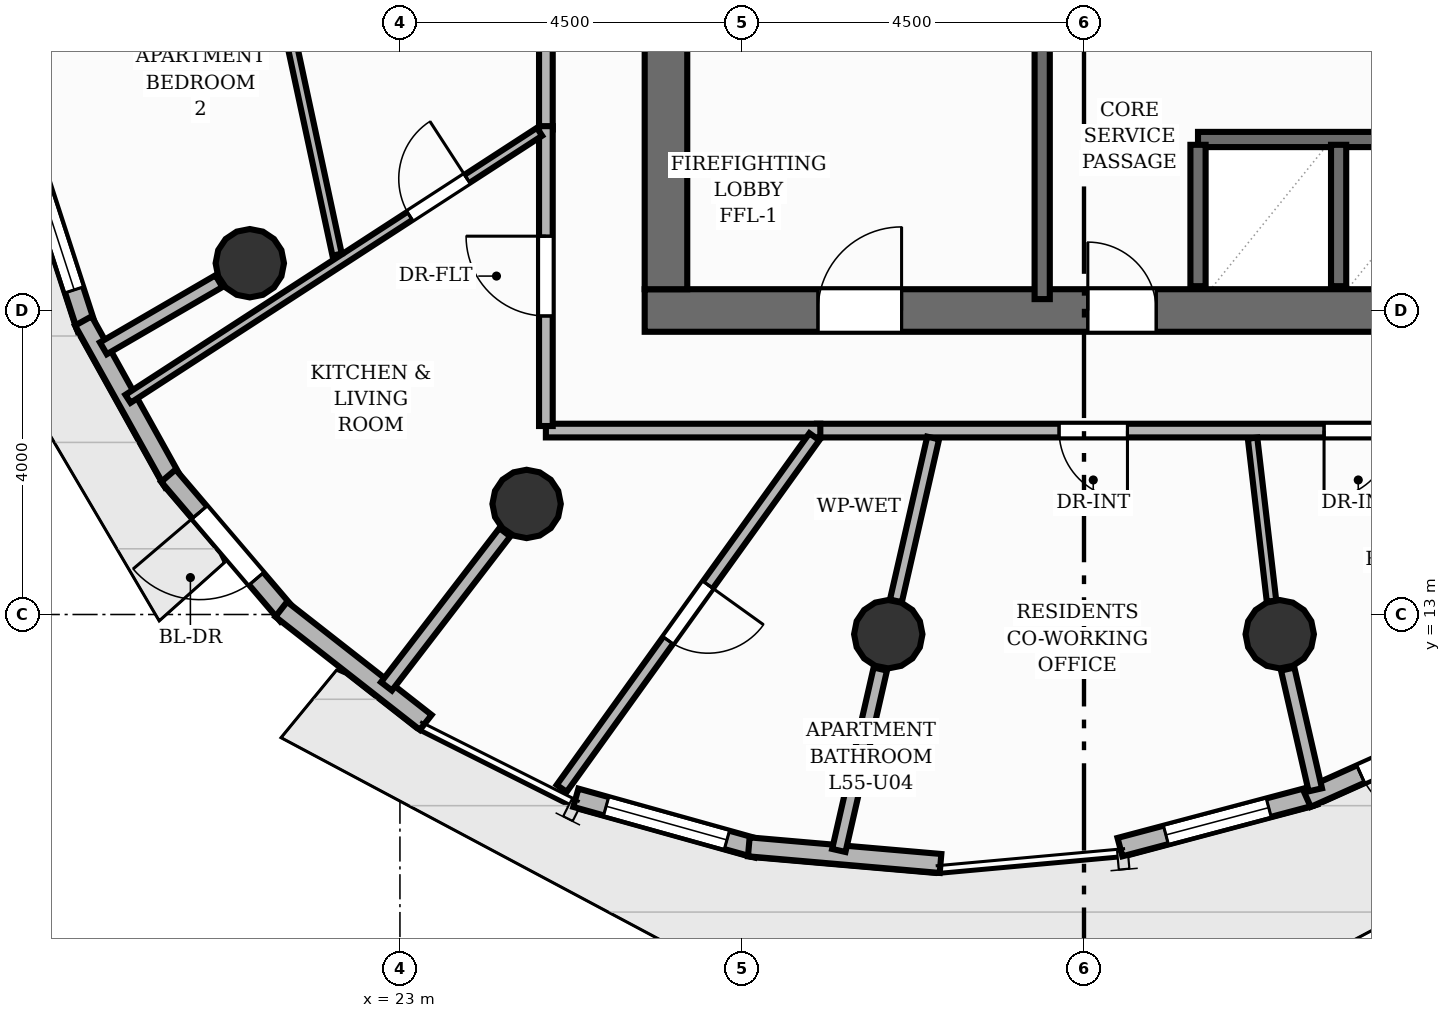
"""IFC4 building model, lengths in metres.
Left out: names, types, materials, properties, quantities, classifications, styles, units other than length and angle.
Written with IfcOpenShell. Run it as: python <this file> out.ifc"""

import sys

from ifc_helpers import new_model, si_unit, direction, frame, frame_2d, origin, origin_2d, place, context, subcontext, project, spatial, rectangle, circle, extrude, element, fill, save


model = new_model("IFC4")
c1 = context("Model", 3, precision=1e-05, world=origin(), true_north=direction((0.0, 1.0)))
c2 = subcontext(c1, "Body", "Model", "MODEL_VIEW")
j1 = project(units=[si_unit("LENGTHUNIT", "METRE"), si_unit("PLANEANGLEUNIT", "RADIAN")], contexts=[c1])
p1 = place(None, origin())
s1 = spatial("IfcSite", under=j1, at=p1, CompositionType="ELEMENT")
p2 = place(p1, origin())
s2 = spatial("IfcBuilding", under=s1, at=p2, CompositionType="ELEMENT")
p3 = place(p2, frame((0.0, 0.0, 185.44)))
s3 = spatial("IfcBuildingStorey", under=s2, at=p3, CompositionType="ELEMENT", Elevation=185.44)
p4 = place(p3, frame((26.22, 17.0, 0.0), z_axis=(0.0, 0.0, 1.0), x_axis=(1.0, 0.0, 0.0)))
e1 = element("IfcWall", 1, at=p4, inside=s3, PredefinedType="SHEAR", context=c2, shape_type="SweptSolid", body=[
    extrude(rectangle(XDim=11.56, YDim=0.56, at=frame_2d((5.78, 0.0))), origin(), (0.0, 0.0, 1.0), 3.2),
])
p5 = place(p4, frame((2.28, 0.0, 0.0)))
e2 = element("IfcOpeningElement", 2, at=p5, cuts=e1, PredefinedType="OPENING", context=c2, shape_type="SweptSolid", body=[
    extrude(rectangle(XDim=1.1, YDim=2.15, at=frame_2d((0.55, 1.075))), frame((0.0, 0.29, 0.0), z_axis=(0.0, -1.0, 0.0), x_axis=(1.0, 0.0, 0.0)), (0.0, 0.0, 1.0), 0.58),
])
p6 = place(p4, frame((5.83, 0.0, 0.0)))
e3 = element("IfcOpeningElement", 3, at=p6, cuts=e1, PredefinedType="OPENING", context=c2, shape_type="SweptSolid", body=[
    extrude(rectangle(XDim=0.9, YDim=2.1, at=frame_2d((0.45, 1.05))), frame((0.0, 0.29, 0.0), z_axis=(0.0, -1.0, 0.0), x_axis=(1.0, 0.0, 0.0)), (0.0, 0.0, 1.0), 0.58),
])
p7 = place(p3, frame((26.5, 17.28, 0.0), z_axis=(0.0, 0.0, 1.0), x_axis=(0.0, 1.0, 0.0)))
e4 = element("IfcWall", 4, at=p7, inside=s3, PredefinedType="SHEAR", context=c2, shape_type="SweptSolid", body=[
    extrude(rectangle(XDim=13.44, YDim=0.56, at=frame_2d((6.72, 0.0))), origin(), (0.0, 0.0, 1.0), 3.2),
])
for number, where, z_axis, x_axis in (
    (5, (21.025, 17.622, 0.0), (0.0, 0.0, 1.0), (1.0, 0.0, 0.0)),
    (6, (24.667, 14.455, 0.0), (0.0, 0.0, 1.0), (1.0, 0.0, 0.0)),
    (7, (29.425, 12.74, 0.0), (0.0, 0.0, 1.0), (1.0, 0.0, 0.0)),
    (8, (34.575, 12.74, 0.0), (0.0, 0.0, 1.0), (1.0, 0.0, 0.0)),
):
    element("IfcColumn", number, at=place(p3, frame(where, z_axis=z_axis, x_axis=x_axis)), inside=s3, PredefinedType="COLUMN", context=c2, shape_type="SweptSolid", body=[
        extrude(circle(Radius=0.45, at=origin_2d()), origin(), (0.0, 0.0, 1.0), 3.2),
    ])
p8 = place(p3, frame((18.881, 16.759, 0.0), z_axis=(0.0, 0.0, 1.0), x_axis=(-0.309005861828, 0.951060133407, 0.0)))
e9 = element("IfcWall", 9, at=p8, inside=s3, PredefinedType="SOLIDWALL", context=c2, shape_type="SweptSolid", body=[
    extrude(rectangle(XDim=2.478, YDim=0.25, at=frame_2d((1.239, 0.0))), origin(), (0.0, 0.0, 1.0), 2.96),
])
p9 = place(p8, frame((0.539, 0.0, 0.85)))
e10 = element("IfcOpeningElement", 10, at=p9, cuts=e9, PredefinedType="OPENING", context=c2, shape_type="SweptSolid", body=[
    extrude(rectangle(XDim=1.4, YDim=1.55, at=frame_2d((0.7, 0.775))), frame((0.0, 0.135, 0.0), z_axis=(0.0, -1.0, 0.0), x_axis=(1.0, 0.0, 0.0)), (0.0, 0.0, 1.0), 0.27),
])
p10 = place(p3, frame((20.019, 14.733, 0.0), z_axis=(0.0, 0.0, 1.0), x_axis=(-0.485821561791, 0.874058013005, 0.0)))
e11 = element("IfcWall", 11, at=p10, inside=s3, PredefinedType="SOLIDWALL", context=c2, shape_type="SweptSolid", body=[
    extrude(rectangle(XDim=2.437, YDim=0.25, at=frame_2d((1.218, 0.0))), origin(), (0.0, 0.0, 1.0), 2.96),
])
p11 = place(p3, frame((21.521, 12.99, 0.0), z_axis=(0.0, 0.0, 1.0), x_axis=(-0.648874307696, 0.760895612297, 0.0)))
e12 = element("IfcWall", 12, at=p11, inside=s3, PredefinedType="SOLIDWALL", context=c2, shape_type="SweptSolid", body=[
    extrude(rectangle(XDim=2.415, YDim=0.25, at=frame_2d((1.208, 0.0))), origin(), (0.0, 0.0, 1.0), 2.96),
])
p12 = place(p11, frame((0.632, 0.0, 0.0)))
e13 = element("IfcOpeningElement", 13, at=p12, cuts=e12, PredefinedType="OPENING", context=c2, shape_type="SweptSolid", body=[
    extrude(rectangle(XDim=1.15, YDim=2.2, at=frame_2d((0.575, 1.1))), frame((0.0, 0.135, 0.0), z_axis=(0.0, -1.0, 0.0), x_axis=(1.0, 0.0, 0.0)), (0.0, 0.0, 1.0), 0.27),
])
p13 = place(p3, frame((23.339, 11.58, 0.0), z_axis=(0.0, 0.0, 1.0), x_axis=(-0.787404715416, 0.616436382883, 0.0)))
e14 = element("IfcWall", 14, at=p13, inside=s3, PredefinedType="SOLIDWALL", context=c2, shape_type="SweptSolid", body=[
    extrude(rectangle(XDim=2.415, YDim=0.25, at=frame_2d((1.208, 0.0))), origin(), (0.0, 0.0, 1.0), 2.96),
])
p14 = place(p3, frame((27.701, 9.923, 0.0), z_axis=(0.0, 0.0, 1.0), x_axis=(-0.96316841201, 0.26889888454, 0.0)))
e15 = element("IfcWall", 15, at=p14, inside=s3, PredefinedType="SOLIDWALL", context=c2, shape_type="SweptSolid", body=[
    extrude(rectangle(XDim=2.478, YDim=0.25, at=frame_2d((1.239, 0.0))), origin(), (0.0, 0.0, 1.0), 2.96),
])
p15 = place(p14, frame((0.414, 0.0, 0.85)))
e16 = element("IfcOpeningElement", 16, at=p15, cuts=e15, PredefinedType="OPENING", context=c2, shape_type="SweptSolid", body=[
    extrude(rectangle(XDim=1.65, YDim=1.55, at=frame_2d((0.825, 0.775))), frame((0.0, 0.135, 0.0), z_axis=(0.0, -1.0, 0.0), x_axis=(1.0, 0.0, 0.0)), (0.0, 0.0, 1.0), 0.27),
])
p16 = place(p3, frame((30.112, 9.724, 0.0), z_axis=(0.0, 0.0, 1.0), x_axis=(-0.996260822813, 0.08639660252, 0.0)))
e17 = element("IfcWall", 17, at=p16, inside=s3, PredefinedType="SOLIDWALL", context=c2, shape_type="SweptSolid", body=[
    extrude(rectangle(XDim=2.532, YDim=0.25, at=frame_2d((1.266, 0.0))), origin(), (0.0, 0.0, 1.0), 2.96),
])
p17 = place(p3, frame((35.035, 10.619, 0.0), z_axis=(0.0, 0.0, 1.0), x_axis=(-0.96652474621, -0.256573410476, 0.0)))
e18 = element("IfcWall", 18, at=p17, inside=s3, PredefinedType="SOLIDWALL", context=c2, shape_type="SweptSolid", body=[
    extrude(rectangle(XDim=2.651, YDim=0.25, at=frame_2d((1.325, 0.0))), origin(), (0.0, 0.0, 1.0), 2.96),
])
p18 = place(p17, frame((0.626, 0.0, 0.85)))
e19 = element("IfcOpeningElement", 19, at=p18, cuts=e18, PredefinedType="OPENING", context=c2, shape_type="SweptSolid", body=[
    extrude(rectangle(XDim=1.4, YDim=1.55, at=frame_2d((0.7, 0.775))), frame((0.0, 0.135, 0.0), z_axis=(0.0, -1.0, 0.0), x_axis=(1.0, 0.0, 0.0)), (0.0, 0.0, 1.0), 0.27),
])
p19 = place(p3, frame((37.397, 11.687, 0.0), z_axis=(0.0, 0.0, 1.0), x_axis=(-0.912615139532, -0.408819773368, 0.0)))
e20 = element("IfcWall", 20, at=p19, inside=s3, PredefinedType="SOLIDWALL", context=c2, shape_type="SweptSolid", body=[
    extrude(rectangle(XDim=2.702, YDim=0.25, at=frame_2d((1.351, 0.0))), origin(), (0.0, 0.0, 1.0), 2.96),
])
p20 = place(p19, frame((0.776, 0.0, 0.0)))
e21 = element("IfcOpeningElement", 21, at=p20, cuts=e20, PredefinedType="OPENING", context=c2, shape_type="SweptSolid", body=[
    extrude(rectangle(XDim=1.15, YDim=2.2, at=frame_2d((0.575, 1.1))), frame((0.0, 0.135, 0.0), z_axis=(0.0, -1.0, 0.0), x_axis=(1.0, 0.0, 0.0)), (0.0, 0.0, 1.0), 0.27),
])
p21 = place(p3, frame((31.45, 17.15, 0.0), z_axis=(0.0, 0.0, 1.0), x_axis=(0.0, 1.0, 0.0)))
e22 = element("IfcWall", 22, at=p21, inside=s3, PredefinedType="SHEAR", context=c2, shape_type="SweptSolid", body=[
    extrude(rectangle(XDim=3.5, YDim=0.2, at=frame_2d((1.75, 0.0))), origin(), (0.0, 0.0, 1.0), 3.2),
])
p22 = place(p3, frame((33.5, 19.25, 0.0), z_axis=(0.0, 0.0, 1.0), x_axis=(1.0, 0.0, 0.0)))
e23 = element("IfcWall", 23, at=p22, inside=s3, PredefinedType="SHEAR", context=c2, shape_type="SweptSolid", body=[
    extrude(rectangle(XDim=3.72, YDim=0.2, at=frame_2d((1.86, 0.0))), origin(), (0.0, 0.0, 1.0), 3.2),
])
for number, where, z_axis, x_axis in (
    (24, (33.5, 17.32, 0.0), (0.0, 0.0, 1.0), (0.0, 1.0, 0.0)),
    (25, (35.35, 17.32, 0.0), (0.0, 0.0, 1.0), (0.0, 1.0, 0.0)),
):
    element("IfcWall", number, at=place(p3, frame(where, z_axis=z_axis, x_axis=x_axis)), inside=s3, PredefinedType="SHEAR", context=c2, shape_type="SweptSolid", body=[
        extrude(rectangle(XDim=1.86, YDim=0.2, at=frame_2d((0.93, 0.0))), origin(), (0.0, 0.0, 1.0), 3.2),
    ])
p23 = place(p3, frame((20.618, 17.386, 0.0), z_axis=(0.0, 0.0, 1.0), x_axis=(-0.86461381872, -0.502437005482, 0.0)))
e26 = element("IfcWall", 26, at=p23, inside=s3, PredefinedType="PARTITIONING", context=c2, shape_type="SweptSolid", body=[
    extrude(rectangle(XDim=1.758, YDim=0.18, at=frame_2d((0.879, 0.0))), origin(), (0.0, 0.0, 1.0), 2.404),
])
p24 = place(p3, frame((24.38, 14.082, 0.0), z_axis=(0.0, 0.0, 1.0), x_axis=(-0.609249164273, -0.792978849549, 0.0)))
e27 = element("IfcWall", 27, at=p24, inside=s3, PredefinedType="PARTITIONING", context=c2, shape_type="SweptSolid", body=[
    extrude(rectangle(XDim=2.557, YDim=0.18, at=frame_2d((1.278, 0.0))), origin(), (0.0, 0.0, 1.0), 2.404),
])
p25 = place(p3, frame((29.32, 12.282, 0.0), z_axis=(0.0, 0.0, 1.0), x_axis=(-0.222943921747, -0.974831271429, 0.0)))
e28 = element("IfcWall", 28, at=p25, inside=s3, PredefinedType="PARTITIONING", context=c2, shape_type="SweptSolid", body=[
    extrude(rectangle(XDim=2.448, YDim=0.18, at=frame_2d((1.224, 0.0))), origin(), (0.0, 0.0, 1.0), 2.404),
])
p26 = place(p3, frame((34.68, 12.282, 0.0), z_axis=(0.0, 0.0, 1.0), x_axis=(0.222967107114, -0.974825968645, 0.0)))
e29 = element("IfcWall", 29, at=p26, inside=s3, PredefinedType="PARTITIONING", context=c2, shape_type="SweptSolid", body=[
    extrude(rectangle(XDim=1.63, YDim=0.18, at=frame_2d((0.815, 0.0))), origin(), (0.0, 0.0, 1.0), 2.404),
])
p27 = place(p3, frame((39.08, 15.42, 0.0), z_axis=(0.0, 0.0, 1.0), x_axis=(-1.0, 0.0, 0.0)))
e30 = element("IfcWall", 30, at=p27, inside=s3, PredefinedType="PARTITIONING", context=c2, shape_type="SweptSolid", body=[
    extrude(rectangle(XDim=10.594, YDim=0.18, at=frame_2d((5.297, 0.0))), origin(), (0.0, 0.0, 1.0), 2.955),
])
p28 = place(p27, frame((3.021, 0.0, 0.0)))
e31 = element("IfcOpeningElement", 31, at=p28, cuts=e30, PredefinedType="OPENING", context=c2, shape_type="SweptSolid", body=[
    extrude(rectangle(XDim=0.9, YDim=2.1, at=frame_2d((0.45, 1.05))), frame((0.0, 0.1, 0.0), z_axis=(0.0, -1.0, 0.0), x_axis=(1.0, 0.0, 0.0)), (0.0, 0.0, 1.0), 0.2),
])
p29 = place(p27, frame((6.508, 0.0, 0.0)))
e32 = element("IfcOpeningElement", 32, at=p29, cuts=e30, PredefinedType="OPENING", context=c2, shape_type="SweptSolid", body=[
    extrude(rectangle(XDim=0.9, YDim=2.1, at=frame_2d((0.45, 1.05))), frame((0.0, 0.1, 0.0), z_axis=(0.0, -1.0, 0.0), x_axis=(1.0, 0.0, 0.0)), (0.0, 0.0, 1.0), 0.2),
])
p30 = place(p3, frame((24.92, 19.382, 0.0), z_axis=(0.0, 0.0, 1.0), x_axis=(0.0, 1.0, 0.0)))
e33 = element("IfcWall", 33, at=p30, inside=s3, PredefinedType="PARTITIONING", context=c2, shape_type="SweptSolid", body=[
    extrude(rectangle(XDim=13.198, YDim=0.18, at=frame_2d((6.599, 0.0))), origin(), (0.0, 0.0, 1.0), 2.955),
])
p31 = place(p30, frame((7.282, 0.0, 0.0)))
e34 = element("IfcOpeningElement", 34, at=p31, cuts=e33, PredefinedType="OPENING", context=c2, shape_type="SweptSolid", body=[
    extrude(rectangle(XDim=0.9, YDim=2.1, at=frame_2d((0.45, 1.05))), frame((0.0, 0.1, 0.0), z_axis=(0.0, -1.0, 0.0), x_axis=(1.0, 0.0, 0.0)), (0.0, 0.0, 1.0), 0.2),
])
p32 = place(p3, frame((28.531, 15.42, 0.0), z_axis=(0.0, 0.0, 1.0), x_axis=(-1.0, 0.0, 0.0)))
e35 = element("IfcWall", 35, at=p32, inside=s3, PredefinedType="PARTITIONING", context=c2, shape_type="SweptSolid", body=[
    extrude(rectangle(XDim=3.611, YDim=0.18, at=frame_2d((1.805, 0.0))), origin(), (0.0, 0.0, 1.0), 2.955),
])
p33 = place(p3, frame((24.92, 15.48, 0.0), z_axis=(0.0, 0.0, 1.0), x_axis=(0.0, 1.0, 0.0)))
e36 = element("IfcWall", 36, at=p33, inside=s3, PredefinedType="PARTITIONING", context=c2, shape_type="SweptSolid", body=[
    extrude(rectangle(XDim=3.946, YDim=0.18, at=frame_2d((1.973, 0.0))), origin(), (0.0, 0.0, 1.0), 2.955),
])
p34 = place(p33, frame((1.448, 0.0, 0.0)))
e37 = element("IfcOpeningElement", 37, at=p34, cuts=e36, PredefinedType="OPENING", context=c2, shape_type="SweptSolid", body=[
    extrude(rectangle(XDim=1.05, YDim=2.15, at=frame_2d((0.525, 1.075))), frame((0.0, 0.1, 0.0), z_axis=(0.0, -1.0, 0.0), x_axis=(1.0, 0.0, 0.0)), (0.0, 0.0, 1.0), 0.2),
])
p35 = place(p3, frame((34.467, 13.176, 0.0), z_axis=(0.0, 0.0, 1.0), x_axis=(-0.115430815868, 0.993315522253, 0.0)))
e38 = element("IfcWall", 38, at=p35, inside=s3, PredefinedType="PARTITIONING", context=c2, shape_type="SweptSolid", body=[
    extrude(rectangle(XDim=2.159, YDim=0.125, at=frame_2d((1.08, 0.0))), origin(), (0.0, 0.0, 1.0), 2.404),
])
p36 = place(p3, frame((29.525, 13.179, 0.0), z_axis=(0.0, 0.0, 1.0), x_axis=(0.222969522248, 0.974825416241, 0.0)))
e39 = element("IfcWall", 39, at=p36, inside=s3, PredefinedType="PLUMBINGWALL", context=c2, shape_type="SweptSolid", body=[
    extrude(rectangle(XDim=2.199, YDim=0.16, at=frame_2d((1.099, 0.0))), origin(), (0.0, 0.0, 1.0), 2.404),
])
p37 = place(p3, frame((28.452, 15.339, 0.0), z_axis=(0.0, 0.0, 1.0), x_axis=(-0.583489481732, -0.812120695899, 0.0)))
e40 = element("IfcWall", 40, at=p37, inside=s3, PredefinedType="PLUMBINGWALL", context=c2, shape_type="SweptSolid", body=[
    extrude(rectangle(XDim=5.698, YDim=0.16, at=frame_2d((2.849, 0.0))), origin(), (0.0, 0.0, 1.0), 2.692),
])
p38 = place(p37, frame((2.399, 0.0, 0.0)))
e41 = element("IfcOpeningElement", 41, at=p38, cuts=e40, PredefinedType="OPENING", context=c2, shape_type="SweptSolid", body=[
    extrude(rectangle(XDim=0.9, YDim=2.1, at=frame_2d((0.45, 1.05))), frame((0.0, 0.09, 0.0), z_axis=(0.0, -1.0, 0.0), x_axis=(1.0, 0.0, 0.0)), (0.0, 0.0, 1.0), 0.18),
])
p39 = place(p3, frame((19.422, 15.838, 0.0), z_axis=(0.0, 0.0, 1.0), x_axis=(0.838876327826, 0.544322061479, 0.0)))
e42 = element("IfcWall", 42, at=p39, inside=s3, PredefinedType="PARTITIONING", context=c2, shape_type="SweptSolid", body=[
    extrude(rectangle(XDim=6.454, YDim=0.125, at=frame_2d((3.227, 0.0))), origin(), (0.0, 0.0, 1.0), 2.955),
])
p40 = place(p39, frame((4.419, 0.0, 0.0)))
e43 = element("IfcOpeningElement", 43, at=p40, cuts=e42, PredefinedType="OPENING", context=c2, shape_type="SweptSolid", body=[
    extrude(rectangle(XDim=0.9, YDim=2.1, at=frame_2d((0.45, 1.05))), frame((0.0, 0.073, 0.0), z_axis=(0.0, -1.0, 0.0), x_axis=(1.0, 0.0, 0.0)), (0.0, 0.0, 1.0), 0.145),
])
p41 = place(p3, frame((22.173, 17.735, 0.0), z_axis=(0.0, 0.0, 1.0), x_axis=(-0.20987090056, 0.977729106194, 0.0)))
e44 = element("IfcWall", 44, at=p41, inside=s3, PredefinedType="PARTITIONING", context=c2, shape_type="SweptSolid", body=[
    extrude(rectangle(XDim=8.341, YDim=0.125, at=frame_2d((4.17, 0.0))), origin(), (0.0, 0.0, 1.0), 2.955),
])
p42 = place(p41, frame((3.72, 0.0, 0.0)))
e45 = element("IfcOpeningElement", 45, at=p42, cuts=e44, PredefinedType="OPENING", context=c2, shape_type="SweptSolid", body=[
    extrude(rectangle(XDim=0.9, YDim=2.1, at=frame_2d((0.45, 1.05))), frame((0.0, 0.073, 0.0), z_axis=(0.0, -1.0, 0.0), x_axis=(1.0, 0.0, 0.0)), (0.0, 0.0, 1.0), 0.145),
])
p43 = place(p12, origin())
e46 = element("IfcDoor", 46, at=p43, inside=s3, OperationType="SINGLE_SWING_RIGHT", PredefinedType="DOOR", context=c2, shape_type="SweptSolid", body=[
    extrude(rectangle(XDim=1.15, YDim=2.2, at=frame_2d((0.575, 1.1))), frame((0.0, 0.025, 0.0), z_axis=(0.0, -1.0, 0.0), x_axis=(1.0, 0.0, 0.0)), (0.0, 0.0, 1.0), 0.05),
])
fill(e13, e46)
p44 = place(p20, origin())
e47 = element("IfcDoor", 47, at=p44, inside=s3, OperationType="SINGLE_SWING_LEFT", PredefinedType="DOOR", context=c2, shape_type="SweptSolid", body=[
    extrude(rectangle(XDim=1.15, YDim=2.2, at=frame_2d((0.575, 1.1))), frame((0.0, 0.025, 0.0), z_axis=(0.0, -1.0, 0.0), x_axis=(1.0, 0.0, 0.0)), (0.0, 0.0, 1.0), 0.05),
])
fill(e21, e47)
p45 = place(p9, origin())
e48 = element("IfcWindow", 48, at=p45, inside=s3, PartitioningType="SINGLE_PANEL", PredefinedType="WINDOW", context=c2, shape_type="SweptSolid", body=[
    extrude(rectangle(XDim=1.4, YDim=1.55, at=frame_2d((0.7, 0.775))), frame((0.0, 0.03, 0.0), z_axis=(0.0, -1.0, 0.0), x_axis=(1.0, 0.0, 0.0)), (0.0, 0.0, 1.0), 0.06),
])
fill(e10, e48)
p46 = place(p15, origin())
e49 = element("IfcWindow", 49, at=p46, inside=s3, PartitioningType="SINGLE_PANEL", PredefinedType="WINDOW", context=c2, shape_type="SweptSolid", body=[
    extrude(rectangle(XDim=1.65, YDim=1.55, at=frame_2d((0.825, 0.775))), frame((0.0, 0.03, 0.0), z_axis=(0.0, -1.0, 0.0), x_axis=(1.0, 0.0, 0.0)), (0.0, 0.0, 1.0), 0.06),
])
fill(e16, e49)
p47 = place(p18, origin())
e50 = element("IfcWindow", 50, at=p47, inside=s3, PartitioningType="SINGLE_PANEL", PredefinedType="WINDOW", context=c2, shape_type="SweptSolid", body=[
    extrude(rectangle(XDim=1.4, YDim=1.55, at=frame_2d((0.7, 0.775))), frame((0.0, 0.03, 0.0), z_axis=(0.0, -1.0, 0.0), x_axis=(1.0, 0.0, 0.0)), (0.0, 0.0, 1.0), 0.06),
])
fill(e19, e50)
p48 = place(p5, origin())
e51 = element("IfcDoor", 51, at=p48, inside=s3, OperationType="SINGLE_SWING_RIGHT", PredefinedType="DOOR", context=c2, shape_type="SweptSolid", body=[
    extrude(rectangle(XDim=1.1, YDim=2.15, at=frame_2d((0.55, 1.075))), frame((0.0, 0.025, 0.0), z_axis=(0.0, -1.0, 0.0), x_axis=(1.0, 0.0, 0.0)), (0.0, 0.0, 1.0), 0.05),
])
fill(e2, e51)
p49 = place(p6, origin())
e52 = element("IfcDoor", 52, at=p49, inside=s3, OperationType="SINGLE_SWING_LEFT", PredefinedType="DOOR", context=c2, shape_type="SweptSolid", body=[
    extrude(rectangle(XDim=0.9, YDim=2.1, at=frame_2d((0.45, 1.05))), frame((0.0, 0.025, 0.0), z_axis=(0.0, -1.0, 0.0), x_axis=(1.0, 0.0, 0.0)), (0.0, 0.0, 1.0), 0.05),
])
fill(e3, e52)
p50 = place(p28, origin())
e53 = element("IfcDoor", 53, at=p50, inside=s3, OperationType="SINGLE_SWING_RIGHT", PredefinedType="DOOR", context=c2, shape_type="SweptSolid", body=[
    extrude(rectangle(XDim=0.9, YDim=2.1, at=frame_2d((0.45, 1.05))), frame((0.0, 0.025, 0.0), z_axis=(0.0, -1.0, 0.0), x_axis=(1.0, 0.0, 0.0)), (0.0, 0.0, 1.0), 0.05),
])
fill(e31, e53)
p51 = place(p29, origin())
e54 = element("IfcDoor", 54, at=p51, inside=s3, OperationType="SINGLE_SWING_LEFT", PredefinedType="DOOR", context=c2, shape_type="SweptSolid", body=[
    extrude(rectangle(XDim=0.9, YDim=2.1, at=frame_2d((0.45, 1.05))), frame((0.0, 0.025, 0.0), z_axis=(0.0, -1.0, 0.0), x_axis=(1.0, 0.0, 0.0)), (0.0, 0.0, 1.0), 0.05),
])
fill(e32, e54)
p52 = place(p34, origin())
e55 = element("IfcDoor", 55, at=p52, inside=s3, OperationType="SINGLE_SWING_RIGHT", PredefinedType="DOOR", context=c2, shape_type="SweptSolid", body=[
    extrude(rectangle(XDim=1.05, YDim=2.15, at=frame_2d((0.525, 1.075))), frame((0.0, 0.025, 0.0), z_axis=(0.0, -1.0, 0.0), x_axis=(1.0, 0.0, 0.0)), (0.0, 0.0, 1.0), 0.05),
])
fill(e37, e55)
p53 = place(p38, origin())
e56 = element("IfcDoor", 56, at=p53, inside=s3, OperationType="SINGLE_SWING_LEFT", PredefinedType="DOOR", context=c2, shape_type="SweptSolid", body=[
    extrude(rectangle(XDim=0.9, YDim=2.1, at=frame_2d((0.45, 1.05))), frame((0.0, 0.025, 0.0), z_axis=(0.0, -1.0, 0.0), x_axis=(1.0, 0.0, 0.0)), (0.0, 0.0, 1.0), 0.05),
])
fill(e41, e56)
p54 = place(p40, origin())
e57 = element("IfcDoor", 57, at=p54, inside=s3, OperationType="SINGLE_SWING_RIGHT", PredefinedType="DOOR", context=c2, shape_type="SweptSolid", body=[
    extrude(rectangle(XDim=0.9, YDim=2.1, at=frame_2d((0.45, 1.05))), frame((0.0, 0.025, 0.0), z_axis=(0.0, -1.0, 0.0), x_axis=(1.0, 0.0, 0.0)), (0.0, 0.0, 1.0), 0.05),
])
fill(e43, e57)
save(model, sys.argv[1])
